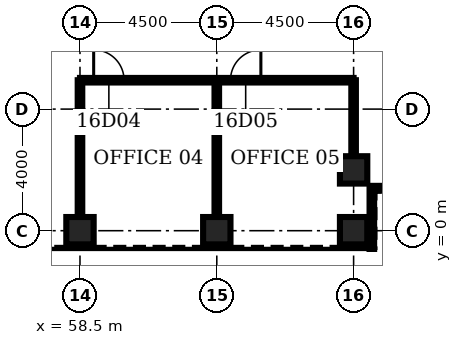
"""IFC4 building model, lengths in metres.
Left out: names, types, materials, properties, quantities, classifications, styles, units other than length and angle.
Written with IfcOpenShell. Run it as: python <this file> out.ifc"""

import sys

from ifc_helpers import new_model, si_unit, direction, frame, frame_2d, origin, origin_2d, place, context, subcontext, project, spatial, rectangle, hollow_rectangle, extrude, element, fill, save


model = new_model("IFC4")
c1 = context("Model", 3, precision=1e-05, world=origin(), true_north=direction((0.0, 1.0)))
c2 = subcontext(c1, "Body", "Model", "MODEL_VIEW")
j1 = project(units=[si_unit("LENGTHUNIT", "METRE"), si_unit("PLANEANGLEUNIT", "RADIAN")], contexts=[c1])
p1 = place(None, origin())
s1 = spatial("IfcSite", under=j1, at=p1, CompositionType="ELEMENT")
p2 = place(p1, origin())
s2 = spatial("IfcBuilding", under=s1, at=p2, CompositionType="ELEMENT")
p3 = place(p2, frame((0.0, 0.0, 77.0)))
s3 = spatial("IfcBuildingStorey", under=s2, at=p3, CompositionType="ELEMENT", Elevation=77.0)
for number, where, z_axis, x_axis in (
    (1, (58.5, 0.0, 0.0), (0.0, 0.0, 1.0), (0.0, 1.0, 0.0)),
    (2, (63.0, 0.0, 0.0), (0.0, 0.0, 1.0), (0.0, 1.0, 0.0)),
    (3, (67.5, 0.0, 0.0), (0.0, 0.0, 1.0), (0.0, 1.0, 0.0)),
    (4, (67.5, 2.0, 0.0), (0.0, 0.0, 1.0), (0.0, 1.0, 0.0)),
):
    element("IfcColumn", number, at=place(p3, frame(where, z_axis=z_axis, x_axis=x_axis)), inside=s3, PredefinedType="COLUMN", context=c2, shape_type="SweptSolid", body=[
        extrude(hollow_rectangle(XDim=0.9, YDim=0.9, WallThickness=0.11, at=origin_2d()), origin(), (0.0, 0.0, 1.0), 4.5),
    ])
p4 = place(p3, frame((58.5, 4.95, 0.0), z_axis=(0.0, 0.0, 1.0), x_axis=(1.0, 0.0, 0.0)))
e5 = element("IfcWall", 5, at=p4, inside=s3, PredefinedType="PARTITIONING", context=c2, shape_type="SweptSolid", body=[
    extrude(rectangle(XDim=9.0, YDim=0.15, at=frame_2d((4.5, 0.0))), origin(), (0.0, 0.0, 1.0), 3.0),
])
p5 = place(p4, frame((0.45, 0.0, 0.0)))
e6 = element("IfcOpeningElement", 6, at=p5, cuts=e5, PredefinedType="OPENING", context=c2, shape_type="SweptSolid", body=[
    extrude(rectangle(XDim=1.0, YDim=2.1, at=frame_2d((0.5, 1.05))), frame((0.0, 0.085, 0.0), z_axis=(0.0, -1.0, 0.0), x_axis=(1.0, 0.0, 0.0)), (0.0, 0.0, 1.0), 0.17),
])
p6 = place(p4, frame((4.95, 0.0, 0.0)))
e7 = element("IfcOpeningElement", 7, at=p6, cuts=e5, PredefinedType="OPENING", context=c2, shape_type="SweptSolid", body=[
    extrude(rectangle(XDim=1.0, YDim=2.1, at=frame_2d((0.5, 1.05))), frame((0.0, 0.085, 0.0), z_axis=(0.0, -1.0, 0.0), x_axis=(1.0, 0.0, 0.0)), (0.0, 0.0, 1.0), 0.17),
])
for number, where, z_axis, x_axis in (
    (8, (58.5, 0.45, 0.0), (0.0, 0.0, 1.0), (0.0, 1.0, 0.0)),
    (9, (63.0, 0.45, 0.0), (0.0, 0.0, 1.0), (0.0, 1.0, 0.0)),
):
    element("IfcWall", number, at=place(p3, frame(where, z_axis=z_axis, x_axis=x_axis)), inside=s3, PredefinedType="PARTITIONING", context=c2, shape_type="SweptSolid", body=[
        extrude(rectangle(XDim=4.5, YDim=0.15, at=frame_2d((2.25, 0.0))), origin(), (0.0, 0.0, 1.0), 3.0),
    ])
p7 = place(p3, frame((67.5, 2.45, 0.0), z_axis=(0.0, 0.0, 1.0), x_axis=(0.0, 1.0, 0.0)))
e10 = element("IfcWall", 10, at=p7, inside=s3, PredefinedType="PARTITIONING", context=c2, shape_type="SweptSolid", body=[
    extrude(rectangle(XDim=2.5, YDim=0.15, at=frame_2d((1.25, 0.0))), origin(), (0.0, 0.0, 1.0), 3.0),
])
p8 = place(p3, frame((68.1, -0.6, 0.0), z_axis=(0.0, 0.0, 1.0), x_axis=(0.0, 1.0, 0.0)))
e11 = element("IfcWall", 11, at=p8, inside=s3, PredefinedType="ELEMENTEDWALL", context=c2, shape_type="SweptSolid", body=[
    extrude(rectangle(XDim=2.0, YDim=0.15, at=frame_2d((1.0, 0.0))), origin(), (0.0, 0.0, 1.0), 4.32),
])
p9 = place(p3, frame((68.1, 1.4, 0.0), z_axis=(0.0, 0.0, 1.0), x_axis=(1.0, 0.0, 0.0)))
e12 = element("IfcWall", 12, at=p9, inside=s3, PredefinedType="ELEMENTEDWALL", context=c2, shape_type="SweptSolid", body=[
    extrude(rectangle(XDim=2.25, YDim=0.15, at=frame_2d((1.125, 0.0))), origin(), (0.0, 0.0, 1.0), 4.32),
])
p10 = place(p5, origin())
e13 = element("IfcDoor", 13, at=p10, inside=s3, OperationType="SINGLE_SWING_LEFT", PredefinedType="DOOR", context=c2, shape_type="SweptSolid", body=[
    extrude(rectangle(XDim=1.0, YDim=2.1, at=frame_2d((0.5, 1.05))), frame((0.0, 0.025, 0.0), z_axis=(0.0, -1.0, 0.0), x_axis=(1.0, 0.0, 0.0)), (0.0, 0.0, 1.0), 0.05),
])
fill(e6, e13)
p11 = place(p6, origin())
e14 = element("IfcDoor", 14, at=p11, inside=s3, OperationType="SINGLE_SWING_RIGHT", PredefinedType="DOOR", context=c2, shape_type="SweptSolid", body=[
    extrude(rectangle(XDim=1.0, YDim=2.1, at=frame_2d((0.5, 1.05))), frame((0.0, 0.025, 0.0), z_axis=(0.0, -1.0, 0.0), x_axis=(1.0, 0.0, 0.0)), (0.0, 0.0, 1.0), 0.05),
])
fill(e7, e14)
save(model, sys.argv[1])
